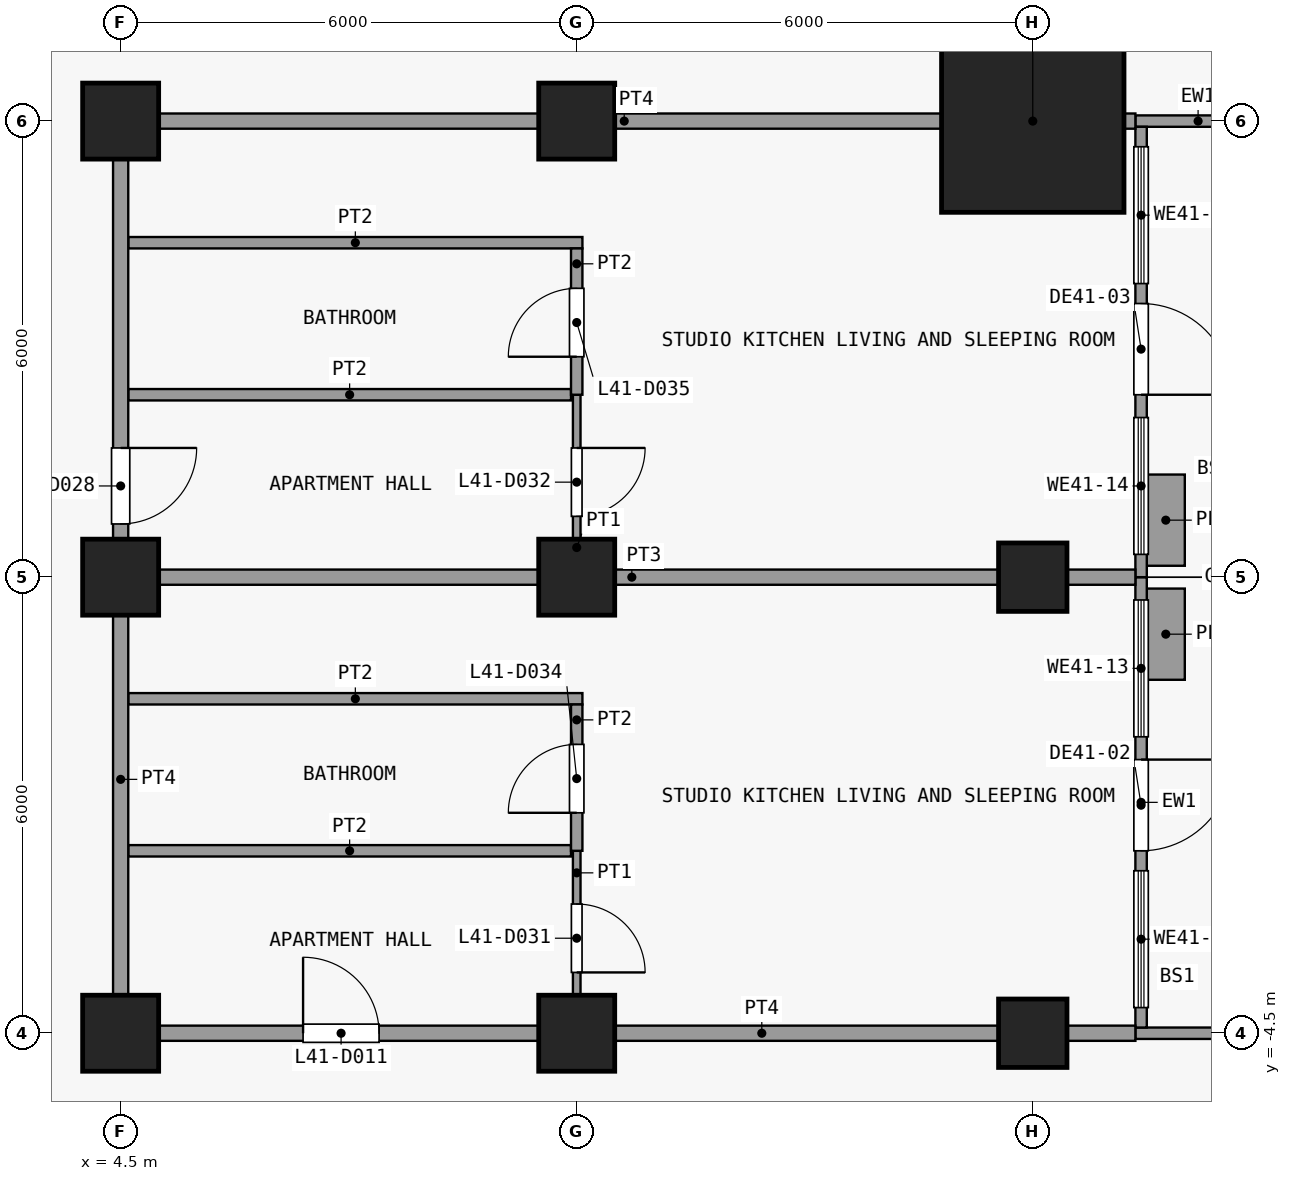
"""IFC4 building model, lengths in metres.
Left out: names, types, materials, properties, quantities, classifications, styles, units other than length and angle.
Written with IfcOpenShell. Run it as: python <this file> out.ifc"""

import sys

from ifc_helpers import new_model, si_unit, direction, frame, frame_2d, origin, origin_2d, place, context, subcontext, project, spatial, rectangle, extrude, element, fill, save


model = new_model("IFC4")
c1 = context("Model", 3, precision=1e-05, world=origin(), true_north=direction((0.0, 1.0)))
c2 = subcontext(c1, "Body", "Model", "MODEL_VIEW")
j1 = project(units=[si_unit("LENGTHUNIT", "METRE"), si_unit("PLANEANGLEUNIT", "RADIAN")], contexts=[c1])
p1 = place(None, origin())
s1 = spatial("IfcSite", under=j1, at=p1, CompositionType="ELEMENT")
p2 = place(p1, origin())
s2 = spatial("IfcBuilding", under=s1, at=p2, CompositionType="ELEMENT")
p3 = place(p2, frame((0.0, 0.0, 167.3)))
s3 = spatial("IfcBuildingStorey", under=s2, at=p3, CompositionType="ELEMENT", Elevation=167.3)
for number, where, z_axis, x_axis in (
    (1, (4.5, -4.5, 0.0), (0.0, 0.0, 1.0), (1.0, 0.0, 0.0)),
    (2, (4.5, 1.5, 0.0), (0.0, 0.0, 1.0), (1.0, 0.0, 0.0)),
    (3, (4.5, 7.5, 0.0), (0.0, 0.0, 1.0), (1.0, 0.0, 0.0)),
    (4, (10.5, -4.5, 0.0), (0.0, 0.0, 1.0), (1.0, 0.0, 0.0)),
    (5, (10.5, 1.5, 0.0), (0.0, 0.0, 1.0), (1.0, 0.0, 0.0)),
    (6, (10.5, 7.5, 0.0), (0.0, 0.0, 1.0), (1.0, 0.0, 0.0)),
):
    element("IfcColumn", number, at=place(p3, frame(where, z_axis=z_axis, x_axis=x_axis)), inside=s3, PredefinedType="COLUMN", context=c2, shape_type="SweptSolid", body=[
        extrude(rectangle(XDim=1.0, YDim=1.0, at=origin_2d()), origin(), (0.0, 0.0, 1.0), 3.6),
    ])
for number, where, z_axis, x_axis in (
    (7, (16.5, -4.5, 0.0), (0.0, 0.0, 1.0), (1.0, 0.0, 0.0)),
    (8, (16.5, 1.5, 0.0), (0.0, 0.0, 1.0), (1.0, 0.0, 0.0)),
):
    element("IfcColumn", number, at=place(p3, frame(where, z_axis=z_axis, x_axis=x_axis)), inside=s3, PredefinedType="COLUMN", context=c2, shape_type="SweptSolid", body=[
        extrude(rectangle(XDim=0.9, YDim=0.9, at=origin_2d()), origin(), (0.0, 0.0, 1.0), 3.6),
    ])
p4 = place(p3, frame((16.5, 7.5, 0.0), z_axis=(0.0, 0.0, 1.0), x_axis=(1.0, 0.0, 0.0)))
e9 = element("IfcColumn", 9, at=p4, inside=s3, PredefinedType="COLUMN", context=c2, shape_type="SweptSolid", body=[
    extrude(rectangle(XDim=2.4, YDim=2.4, at=origin_2d()), origin(), (0.0, 0.0, 1.0), 3.6),
])
p5 = place(p3, frame((17.85, -4.5, 0.0), z_axis=(0.0, 0.0, 1.0), x_axis=(1.0, 0.0, 0.0)))
e10 = element("IfcWall", 10, at=p5, inside=s3, PredefinedType="SOLIDWALL", context=c2, shape_type="SweptSolid", body=[
    extrude(rectangle(XDim=2.55, YDim=0.15, at=frame_2d((1.275, 0.0))), origin(), (0.0, 0.0, 1.0), 3.3),
])
p6 = place(p3, frame((17.925, 1.5, 0.0), z_axis=(0.0, 0.0, 1.0), x_axis=(0.0, -1.0, 0.0)))
e11 = element("IfcWall", 11, at=p6, inside=s3, PredefinedType="SOLIDWALL", context=c2, shape_type="SweptSolid", body=[
    extrude(rectangle(XDim=5.925, YDim=0.15, at=frame_2d((2.962, 0.0))), origin(), (0.0, 0.0, 1.0), 3.3),
])
p7 = place(p6, frame((2.4, 0.0, 0.0)))
e12 = element("IfcOpeningElement", 12, at=p7, cuts=e11, PredefinedType="OPENING", context=c2, shape_type="SweptSolid", body=[
    extrude(rectangle(XDim=1.2, YDim=2.4, at=frame_2d((0.6, 1.2))), frame((0.0, 0.085, 0.0), z_axis=(0.0, -1.0, 0.0), x_axis=(1.0, 0.0, 0.0)), (0.0, 0.0, 1.0), 0.17),
])
p8 = place(p6, frame((3.863, 0.0, 0.9)))
e13 = element("IfcOpeningElement", 13, at=p8, cuts=e11, PredefinedType="OPENING", context=c2, shape_type="SweptSolid", body=[
    extrude(rectangle(XDim=1.8, YDim=2.1, at=frame_2d((0.9, 1.05))), frame((0.0, 0.085, 0.0), z_axis=(0.0, -1.0, 0.0), x_axis=(1.0, 0.0, 0.0)), (0.0, 0.0, 1.0), 0.17),
])
p9 = place(p6, frame((0.3, 0.0, 0.9)))
e14 = element("IfcOpeningElement", 14, at=p9, cuts=e11, PredefinedType="OPENING", context=c2, shape_type="SweptSolid", body=[
    extrude(rectangle(XDim=1.8, YDim=2.1, at=frame_2d((0.9, 1.05))), frame((0.0, 0.085, 0.0), z_axis=(0.0, -1.0, 0.0), x_axis=(1.0, 0.0, 0.0)), (0.0, 0.0, 1.0), 0.17),
])
p10 = place(p3, frame((18.25, 0.15, 0.0), z_axis=(0.0, 0.0, 1.0), x_axis=(0.0, 1.0, 0.0)))
e15 = element("IfcWall", 15, at=p10, inside=s3, PredefinedType="USERDEFINED", context=c2, shape_type="SweptSolid", body=[
    extrude(rectangle(XDim=1.2, YDim=0.5, at=frame_2d((0.6, 0.0))), origin(), (0.0, 0.0, 1.0), 0.9),
])
p11 = place(p3, frame((17.85, 7.5, 0.0), z_axis=(0.0, 0.0, 1.0), x_axis=(1.0, 0.0, 0.0)))
e16 = element("IfcWall", 16, at=p11, inside=s3, PredefinedType="SOLIDWALL", context=c2, shape_type="SweptSolid", body=[
    extrude(rectangle(XDim=1.65, YDim=0.15, at=frame_2d((0.825, 0.0))), origin(), (0.0, 0.0, 1.0), 3.3),
])
p12 = place(p3, frame((17.925, 7.425, 0.0), z_axis=(0.0, 0.0, 1.0), x_axis=(0.0, -1.0, 0.0)))
e17 = element("IfcWall", 17, at=p12, inside=s3, PredefinedType="SOLIDWALL", context=c2, shape_type="SweptSolid", body=[
    extrude(rectangle(XDim=5.925, YDim=0.15, at=frame_2d((2.962, 0.0))), origin(), (0.0, 0.0, 1.0), 3.3),
])
p13 = place(p12, frame((2.325, 0.0, 0.0)))
e18 = element("IfcOpeningElement", 18, at=p13, cuts=e17, PredefinedType="OPENING", context=c2, shape_type="SweptSolid", body=[
    extrude(rectangle(XDim=1.2, YDim=2.4, at=frame_2d((0.6, 1.2))), frame((0.0, 0.085, 0.0), z_axis=(0.0, -1.0, 0.0), x_axis=(1.0, 0.0, 0.0)), (0.0, 0.0, 1.0), 0.17),
])
p14 = place(p12, frame((3.825, 0.0, 0.9)))
e19 = element("IfcOpeningElement", 19, at=p14, cuts=e17, PredefinedType="OPENING", context=c2, shape_type="SweptSolid", body=[
    extrude(rectangle(XDim=1.8, YDim=2.1, at=frame_2d((0.9, 1.05))), frame((0.0, 0.085, 0.0), z_axis=(0.0, -1.0, 0.0), x_axis=(1.0, 0.0, 0.0)), (0.0, 0.0, 1.0), 0.17),
])
p15 = place(p12, frame((0.262, 0.0, 0.9)))
e20 = element("IfcOpeningElement", 20, at=p15, cuts=e17, PredefinedType="OPENING", context=c2, shape_type="SweptSolid", body=[
    extrude(rectangle(XDim=1.8, YDim=2.1, at=frame_2d((0.9, 1.05))), frame((0.0, 0.085, 0.0), z_axis=(0.0, -1.0, 0.0), x_axis=(1.0, 0.0, 0.0)), (0.0, 0.0, 1.0), 0.17),
])
p16 = place(p3, frame((18.25, 1.65, 0.0), z_axis=(0.0, 0.0, 1.0), x_axis=(0.0, 1.0, 0.0)))
e21 = element("IfcWall", 21, at=p16, inside=s3, PredefinedType="USERDEFINED", context=c2, shape_type="SweptSolid", body=[
    extrude(rectangle(XDim=1.2, YDim=0.5, at=frame_2d((0.6, 0.0))), origin(), (0.0, 0.0, 1.0), 0.9),
])
p17 = place(p3, frame((4.4, -4.5, 0.0), z_axis=(0.0, 0.0, 1.0), x_axis=(1.0, 0.0, 0.0)))
e22 = element("IfcWall", 22, at=p17, inside=s3, PredefinedType="PARTITIONING", context=c2, shape_type="SweptSolid", body=[
    extrude(rectangle(XDim=13.45, YDim=0.2, at=frame_2d((6.725, 0.0))), origin(), (0.0, 0.0, 1.0), 3.3),
])
p18 = place(p17, frame((2.5, 0.0, 0.0)))
e23 = element("IfcOpeningElement", 23, at=p18, cuts=e22, PredefinedType="OPENING", context=c2, shape_type="SweptSolid", body=[
    extrude(rectangle(XDim=1.0, YDim=2.1, at=frame_2d((0.5, 1.05))), frame((0.0, 0.11, 0.0), z_axis=(0.0, -1.0, 0.0), x_axis=(1.0, 0.0, 0.0)), (0.0, 0.0, 1.0), 0.22),
])
p19 = place(p3, frame((4.6, -2.1, 0.0), z_axis=(0.0, 0.0, 1.0), x_axis=(1.0, 0.0, 0.0)))
e24 = element("IfcWall", 24, at=p19, inside=s3, PredefinedType="PARTITIONING", context=c2, shape_type="SweptSolid", body=[
    extrude(rectangle(XDim=5.825, YDim=0.15, at=frame_2d((2.913, 0.0))), origin(), (0.0, 0.0, 1.0), 3.3),
])
p20 = place(p3, frame((4.6, -0.1, 0.0), z_axis=(0.0, 0.0, 1.0), x_axis=(1.0, 0.0, 0.0)))
e25 = element("IfcWall", 25, at=p20, inside=s3, PredefinedType="PARTITIONING", context=c2, shape_type="SweptSolid", body=[
    extrude(rectangle(XDim=5.975, YDim=0.15, at=frame_2d((2.987, 0.0))), origin(), (0.0, 0.0, 1.0), 3.3),
])
p21 = place(p3, frame((4.6, 1.5, 0.0), z_axis=(0.0, 0.0, 1.0), x_axis=(1.0, 0.0, 0.0)))
e26 = element("IfcWall", 26, at=p21, inside=s3, PredefinedType="PARTITIONING", context=c2, shape_type="SweptSolid", body=[
    extrude(rectangle(XDim=13.25, YDim=0.2, at=frame_2d((6.625, 0.0))), origin(), (0.0, 0.0, 1.0), 3.3),
])
p22 = place(p3, frame((4.6, 3.9, 0.0), z_axis=(0.0, 0.0, 1.0), x_axis=(1.0, 0.0, 0.0)))
e27 = element("IfcWall", 27, at=p22, inside=s3, PredefinedType="PARTITIONING", context=c2, shape_type="SweptSolid", body=[
    extrude(rectangle(XDim=5.825, YDim=0.15, at=frame_2d((2.913, 0.0))), origin(), (0.0, 0.0, 1.0), 3.3),
])
p23 = place(p3, frame((4.6, 5.9, 0.0), z_axis=(0.0, 0.0, 1.0), x_axis=(1.0, 0.0, 0.0)))
e28 = element("IfcWall", 28, at=p23, inside=s3, PredefinedType="PARTITIONING", context=c2, shape_type="SweptSolid", body=[
    extrude(rectangle(XDim=5.975, YDim=0.15, at=frame_2d((2.987, 0.0))), origin(), (0.0, 0.0, 1.0), 3.3),
])
p24 = place(p3, frame((4.4, 7.5, 0.0), z_axis=(0.0, 0.0, 1.0), x_axis=(1.0, 0.0, 0.0)))
e29 = element("IfcWall", 29, at=p24, inside=s3, PredefinedType="PARTITIONING", context=c2, shape_type="SweptSolid", body=[
    extrude(rectangle(XDim=13.45, YDim=0.2, at=frame_2d((6.725, 0.0))), origin(), (0.0, 0.0, 1.0), 3.3),
])
p25 = place(p3, frame((4.5, -4.4, 0.0), z_axis=(0.0, 0.0, 1.0), x_axis=(0.0, 1.0, 0.0)))
e30 = element("IfcWall", 30, at=p25, inside=s3, PredefinedType="PARTITIONING", context=c2, shape_type="SweptSolid", body=[
    extrude(rectangle(XDim=11.8, YDim=0.2, at=frame_2d((5.9, 0.0))), origin(), (0.0, 0.0, 1.0), 3.3),
])
p26 = place(p25, frame((6.6, 0.0, 0.0)))
e31 = element("IfcOpeningElement", 31, at=p26, cuts=e30, PredefinedType="OPENING", context=c2, shape_type="SweptSolid", body=[
    extrude(rectangle(XDim=1.0, YDim=2.1, at=frame_2d((0.5, 1.05))), frame((0.0, 0.11, 0.0), z_axis=(0.0, -1.0, 0.0), x_axis=(1.0, 0.0, 0.0)), (0.0, 0.0, 1.0), 0.22),
])
p27 = place(p3, frame((10.5, -4.4, 0.0), z_axis=(0.0, 0.0, 1.0), x_axis=(0.0, 1.0, 0.0)))
e32 = element("IfcWall", 32, at=p27, inside=s3, PredefinedType="PARTITIONING", context=c2, shape_type="SweptSolid", body=[
    extrude(rectangle(XDim=2.3, YDim=0.1, at=frame_2d((1.15, 0.0))), origin(), (0.0, 0.0, 1.0), 3.3),
])
p28 = place(p27, frame((0.7, 0.0, 0.0)))
e33 = element("IfcOpeningElement", 33, at=p28, cuts=e32, PredefinedType="OPENING", context=c2, shape_type="SweptSolid", body=[
    extrude(rectangle(XDim=0.9, YDim=2.1, at=frame_2d((0.45, 1.05))), frame((0.0, 0.06, 0.0), z_axis=(0.0, -1.0, 0.0), x_axis=(1.0, 0.0, 0.0)), (0.0, 0.0, 1.0), 0.12),
])
p29 = place(p3, frame((10.5, 1.6, 0.0), z_axis=(0.0, 0.0, 1.0), x_axis=(0.0, 1.0, 0.0)))
e34 = element("IfcWall", 34, at=p29, inside=s3, PredefinedType="PARTITIONING", context=c2, shape_type="SweptSolid", body=[
    extrude(rectangle(XDim=2.3, YDim=0.1, at=frame_2d((1.15, 0.0))), origin(), (0.0, 0.0, 1.0), 3.3),
])
p30 = place(p29, frame((0.7, 0.0, 0.0)))
e35 = element("IfcOpeningElement", 35, at=p30, cuts=e34, PredefinedType="OPENING", context=c2, shape_type="SweptSolid", body=[
    extrude(rectangle(XDim=0.9, YDim=2.1, at=frame_2d((0.45, 1.05))), frame((0.0, 0.06, 0.0), z_axis=(0.0, -1.0, 0.0), x_axis=(1.0, 0.0, 0.0)), (0.0, 0.0, 1.0), 0.12),
])
p31 = place(p3, frame((10.5, -2.1, 0.0), z_axis=(0.0, 0.0, 1.0), x_axis=(0.0, 1.0, 0.0)))
e36 = element("IfcWall", 36, at=p31, inside=s3, PredefinedType="PARTITIONING", context=c2, shape_type="SweptSolid", body=[
    extrude(rectangle(XDim=1.925, YDim=0.15, at=frame_2d((0.962, 0.0))), origin(), (0.0, 0.0, 1.0), 3.3),
])
p32 = place(p31, frame((0.5, 0.0, 0.0)))
e37 = element("IfcOpeningElement", 37, at=p32, cuts=e36, PredefinedType="OPENING", context=c2, shape_type="SweptSolid", body=[
    extrude(rectangle(XDim=0.9, YDim=2.1, at=frame_2d((0.45, 1.05))), frame((0.0, 0.085, 0.0), z_axis=(0.0, -1.0, 0.0), x_axis=(1.0, 0.0, 0.0)), (0.0, 0.0, 1.0), 0.17),
])
p33 = place(p3, frame((10.5, 3.9, 0.0), z_axis=(0.0, 0.0, 1.0), x_axis=(0.0, 1.0, 0.0)))
e38 = element("IfcWall", 38, at=p33, inside=s3, PredefinedType="PARTITIONING", context=c2, shape_type="SweptSolid", body=[
    extrude(rectangle(XDim=1.925, YDim=0.15, at=frame_2d((0.962, 0.0))), origin(), (0.0, 0.0, 1.0), 3.3),
])
p34 = place(p33, frame((0.5, 0.0, 0.0)))
e39 = element("IfcOpeningElement", 39, at=p34, cuts=e38, PredefinedType="OPENING", context=c2, shape_type="SweptSolid", body=[
    extrude(rectangle(XDim=0.9, YDim=2.1, at=frame_2d((0.45, 1.05))), frame((0.0, 0.085, 0.0), z_axis=(0.0, -1.0, 0.0), x_axis=(1.0, 0.0, 0.0)), (0.0, 0.0, 1.0), 0.17),
])
p35 = place(p7, origin())
e40 = element("IfcDoor", 40, at=p35, inside=s3, OperationType="SINGLE_SWING_LEFT", PredefinedType="DOOR", context=c2, shape_type="SweptSolid", body=[
    extrude(rectangle(XDim=1.2, YDim=2.4, at=frame_2d((0.6, 1.2))), frame((0.0, 0.025, 0.0), z_axis=(0.0, -1.0, 0.0), x_axis=(1.0, 0.0, 0.0)), (0.0, 0.0, 1.0), 0.05),
])
fill(e12, e40)
p36 = place(p8, origin())
e41 = element("IfcWindow", 41, at=p36, inside=s3, PartitioningType="SINGLE_PANEL", PredefinedType="WINDOW", context=c2, shape_type="SweptSolid", body=[
    extrude(rectangle(XDim=1.8, YDim=2.1, at=frame_2d((0.9, 1.05))), frame((0.0, 0.03, 0.0), z_axis=(0.0, -1.0, 0.0), x_axis=(1.0, 0.0, 0.0)), (0.0, 0.0, 1.0), 0.06),
])
fill(e13, e41)
p37 = place(p9, origin())
e42 = element("IfcWindow", 42, at=p37, inside=s3, PartitioningType="SINGLE_PANEL", PredefinedType="WINDOW", context=c2, shape_type="SweptSolid", body=[
    extrude(rectangle(XDim=1.8, YDim=2.1, at=frame_2d((0.9, 1.05))), frame((0.0, 0.03, 0.0), z_axis=(0.0, -1.0, 0.0), x_axis=(1.0, 0.0, 0.0)), (0.0, 0.0, 1.0), 0.06),
])
fill(e14, e42)
p38 = place(p13, origin())
e43 = element("IfcDoor", 43, at=p38, inside=s3, OperationType="SINGLE_SWING_RIGHT", PredefinedType="DOOR", context=c2, shape_type="SweptSolid", body=[
    extrude(rectangle(XDim=1.2, YDim=2.4, at=frame_2d((0.6, 1.2))), frame((0.0, 0.025, 0.0), z_axis=(0.0, -1.0, 0.0), x_axis=(1.0, 0.0, 0.0)), (0.0, 0.0, 1.0), 0.05),
])
fill(e18, e43)
p39 = place(p14, origin())
e44 = element("IfcWindow", 44, at=p39, inside=s3, PartitioningType="SINGLE_PANEL", PredefinedType="WINDOW", context=c2, shape_type="SweptSolid", body=[
    extrude(rectangle(XDim=1.8, YDim=2.1, at=frame_2d((0.9, 1.05))), frame((0.0, 0.03, 0.0), z_axis=(0.0, -1.0, 0.0), x_axis=(1.0, 0.0, 0.0)), (0.0, 0.0, 1.0), 0.06),
])
fill(e19, e44)
p40 = place(p15, origin())
e45 = element("IfcWindow", 45, at=p40, inside=s3, PartitioningType="SINGLE_PANEL", PredefinedType="WINDOW", context=c2, shape_type="SweptSolid", body=[
    extrude(rectangle(XDim=1.8, YDim=2.1, at=frame_2d((0.9, 1.05))), frame((0.0, 0.03, 0.0), z_axis=(0.0, -1.0, 0.0), x_axis=(1.0, 0.0, 0.0)), (0.0, 0.0, 1.0), 0.06),
])
fill(e20, e45)
p41 = place(p18, origin())
e46 = element("IfcDoor", 46, at=p41, inside=s3, OperationType="SINGLE_SWING_RIGHT", PredefinedType="DOOR", context=c2, shape_type="SweptSolid", body=[
    extrude(rectangle(XDim=1.0, YDim=2.1, at=frame_2d((0.5, 1.05))), frame((0.0, 0.025, 0.0), z_axis=(0.0, -1.0, 0.0), x_axis=(1.0, 0.0, 0.0)), (0.0, 0.0, 1.0), 0.05),
])
fill(e23, e46)
p42 = place(p26, origin())
e47 = element("IfcDoor", 47, at=p42, inside=s3, OperationType="SINGLE_SWING_RIGHT", PredefinedType="DOOR", context=c2, shape_type="SweptSolid", body=[
    extrude(rectangle(XDim=1.0, YDim=2.1, at=frame_2d((0.5, 1.05))), frame((0.0, 0.025, 0.0), z_axis=(0.0, -1.0, 0.0), x_axis=(1.0, 0.0, 0.0)), (0.0, 0.0, 1.0), 0.05),
])
fill(e31, e47)
p43 = place(p28, origin())
e48 = element("IfcDoor", 48, at=p43, inside=s3, OperationType="SINGLE_SWING_LEFT", PredefinedType="DOOR", context=c2, shape_type="SweptSolid", body=[
    extrude(rectangle(XDim=0.9, YDim=2.1, at=frame_2d((0.45, 1.05))), frame((0.0, 0.025, 0.0), z_axis=(0.0, -1.0, 0.0), x_axis=(1.0, 0.0, 0.0)), (0.0, 0.0, 1.0), 0.05),
])
fill(e33, e48)
p44 = place(p30, origin())
e49 = element("IfcDoor", 49, at=p44, inside=s3, OperationType="SINGLE_SWING_RIGHT", PredefinedType="DOOR", context=c2, shape_type="SweptSolid", body=[
    extrude(rectangle(XDim=0.9, YDim=2.1, at=frame_2d((0.45, 1.05))), frame((0.0, 0.025, 0.0), z_axis=(0.0, -1.0, 0.0), x_axis=(1.0, 0.0, 0.0)), (0.0, 0.0, 1.0), 0.05),
])
fill(e35, e49)
p45 = place(p32, origin())
e50 = element("IfcDoor", 50, at=p45, inside=s3, OperationType="SINGLE_SWING_RIGHT", PredefinedType="DOOR", context=c2, shape_type="SweptSolid", body=[
    extrude(rectangle(XDim=0.9, YDim=2.1, at=frame_2d((0.45, 1.05))), frame((0.0, 0.025, 0.0), z_axis=(0.0, -1.0, 0.0), x_axis=(1.0, 0.0, 0.0)), (0.0, 0.0, 1.0), 0.05),
])
fill(e37, e50)
p46 = place(p34, origin())
e51 = element("IfcDoor", 51, at=p46, inside=s3, OperationType="SINGLE_SWING_RIGHT", PredefinedType="DOOR", context=c2, shape_type="SweptSolid", body=[
    extrude(rectangle(XDim=0.9, YDim=2.1, at=frame_2d((0.45, 1.05))), frame((0.0, 0.025, 0.0), z_axis=(0.0, -1.0, 0.0), x_axis=(1.0, 0.0, 0.0)), (0.0, 0.0, 1.0), 0.05),
])
fill(e39, e51)
save(model, sys.argv[1])
